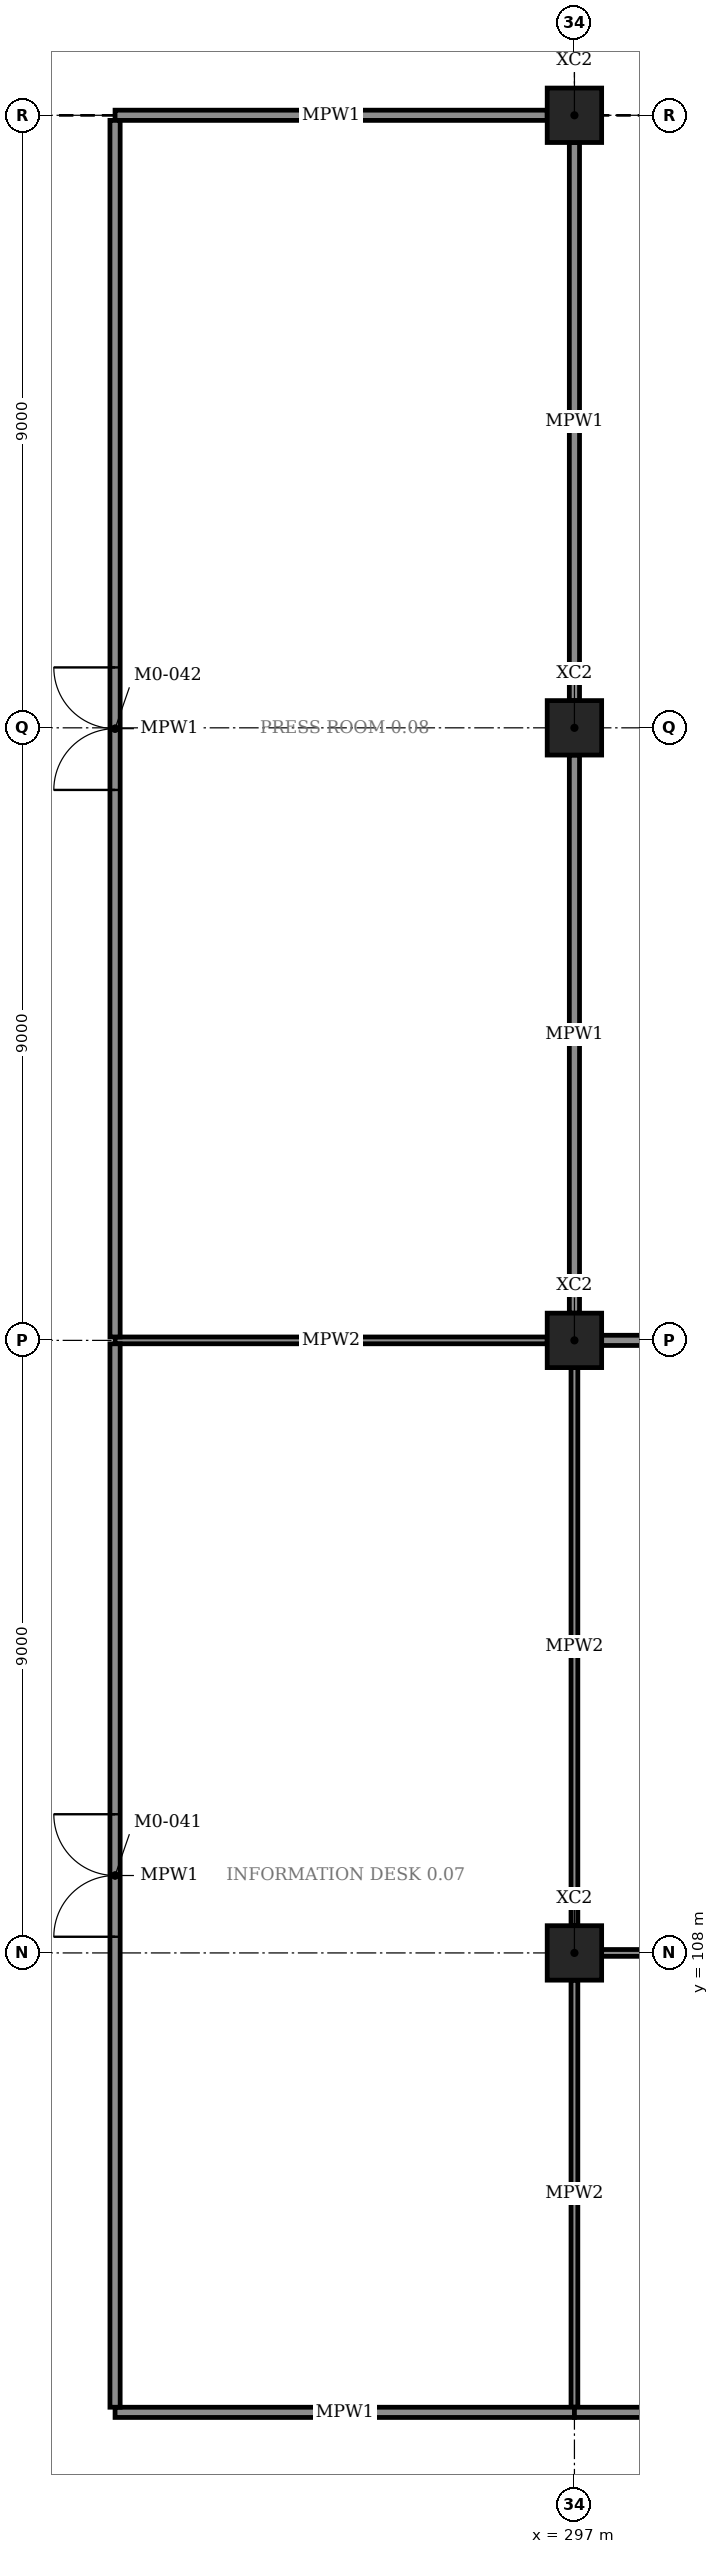
"""IFC4 building model, lengths in metres.
Left out: names, types, materials, properties, quantities, classifications, styles, units other than length and angle.
Written with IfcOpenShell. Run it as: python <this file> out.ifc"""

import sys

from ifc_helpers import new_model, si_unit, direction, frame, frame_2d, origin, origin_2d, place, context, subcontext, project, spatial, rectangle, extrude, element, fill, save


model = new_model("IFC4")
c1 = context("Model", 3, precision=1e-05, world=origin(), true_north=direction((0.0, 1.0)))
c2 = subcontext(c1, "Body", "Model", "MODEL_VIEW")
j1 = project(units=[si_unit("LENGTHUNIT", "METRE"), si_unit("PLANEANGLEUNIT", "RADIAN")], contexts=[c1])
p1 = place(None, origin())
s1 = spatial("IfcSite", under=j1, at=p1, CompositionType="ELEMENT")
p2 = place(p1, origin())
s2 = spatial("IfcBuilding", under=s1, at=p2, CompositionType="ELEMENT")
p3 = place(p2, origin())
s3 = spatial("IfcBuildingStorey", under=s2, at=p3, CompositionType="ELEMENT", Elevation=0.0)
for number, where, z_axis, x_axis in (
    (1, (297.0, 108.0, -0.3), (0.0, 0.0, 1.0), (1.0, 0.0, 0.0)),
    (2, (297.0, 117.0, -0.3), (0.0, 0.0, 1.0), (1.0, 0.0, 0.0)),
    (3, (297.0, 126.0, -0.3), (0.0, 0.0, 1.0), (1.0, 0.0, 0.0)),
    (4, (297.0, 135.0, -0.3), (0.0, 0.0, 1.0), (1.0, 0.0, 0.0)),
):
    element("IfcColumn", number, at=place(p3, frame(where, z_axis=z_axis, x_axis=x_axis)), inside=s3, PredefinedType="COLUMN", context=c2, shape_type="SweptSolid", body=[
        extrude(rectangle(XDim=0.8, YDim=0.8, at=origin_2d()), origin(), (0.0, 0.0, 1.0), 6.3),
    ])
p4 = place(p3, frame((290.25, 101.25, 0.0), z_axis=(0.0, 0.0, 1.0), x_axis=(1.0, 0.0, 0.0)))
e5 = element("IfcWall", 5, at=p4, inside=s3, PredefinedType="PARTITIONING", context=c2, shape_type="SweptSolid", body=[
    extrude(rectangle(XDim=6.75, YDim=0.15, at=frame_2d((3.375, 0.0))), origin(), (0.0, 0.0, 1.0), 4.82),
])
p5 = place(p3, frame((290.25, 117.0, 0.0), z_axis=(0.0, 0.0, 1.0), x_axis=(1.0, 0.0, 0.0)))
e6 = element("IfcWall", 6, at=p5, inside=s3, PredefinedType="PARTITIONING", context=c2, shape_type="SweptSolid", body=[
    extrude(rectangle(XDim=6.35, YDim=0.1, at=frame_2d((3.175, 0.0))), origin(), (0.0, 0.0, 1.0), 4.82),
])
p6 = place(p3, frame((290.25, 101.325, 0.0), z_axis=(0.0, 0.0, 1.0), x_axis=(0.0, 1.0, 0.0)))
e7 = element("IfcWall", 7, at=p6, inside=s3, PredefinedType="PARTITIONING", context=c2, shape_type="SweptSolid", body=[
    extrude(rectangle(XDim=15.625, YDim=0.15, at=frame_2d((7.812, 0.0))), origin(), (0.0, 0.0, 1.0), 4.82),
])
p7 = place(p6, frame((6.913, 0.0, 0.0)))
e8 = element("IfcOpeningElement", 8, at=p7, cuts=e7, PredefinedType="OPENING", context=c2, shape_type="SweptSolid", body=[
    extrude(rectangle(XDim=1.8, YDim=2.4, at=frame_2d((0.9, 1.2))), frame((0.0, 0.085, 0.0), z_axis=(0.0, -1.0, 0.0), x_axis=(1.0, 0.0, 0.0)), (0.0, 0.0, 1.0), 0.17),
])
p8 = place(p3, frame((297.0, 101.325, 0.0), z_axis=(0.0, 0.0, 1.0), x_axis=(0.0, 1.0, 0.0)))
e9 = element("IfcWall", 9, at=p8, inside=s3, PredefinedType="PARTITIONING", context=c2, shape_type="SweptSolid", body=[
    extrude(rectangle(XDim=6.275, YDim=0.1, at=frame_2d((3.138, 0.0))), origin(), (0.0, 0.0, 1.0), 4.82),
])
p9 = place(p3, frame((297.0, 108.4, 0.0), z_axis=(0.0, 0.0, 1.0), x_axis=(0.0, 1.0, 0.0)))
e10 = element("IfcWall", 10, at=p9, inside=s3, PredefinedType="PARTITIONING", context=c2, shape_type="SweptSolid", body=[
    extrude(rectangle(XDim=8.2, YDim=0.1, at=frame_2d((4.1, 0.0))), origin(), (0.0, 0.0, 1.0), 4.82),
])
p10 = place(p3, frame((290.25, 135.0, 0.0), z_axis=(0.0, 0.0, 1.0), x_axis=(1.0, 0.0, 0.0)))
e11 = element("IfcWall", 11, at=p10, inside=s3, PredefinedType="PARTITIONING", context=c2, shape_type="SweptSolid", body=[
    extrude(rectangle(XDim=6.35, YDim=0.15, at=frame_2d((3.175, 0.0))), origin(), (0.0, 0.0, 1.0), 4.82),
])
p11 = place(p3, frame((290.25, 117.05, 0.0), z_axis=(0.0, 0.0, 1.0), x_axis=(0.0, 1.0, 0.0)))
e12 = element("IfcWall", 12, at=p11, inside=s3, PredefinedType="PARTITIONING", context=c2, shape_type="SweptSolid", body=[
    extrude(rectangle(XDim=17.875, YDim=0.15, at=frame_2d((8.938, 0.0))), origin(), (0.0, 0.0, 1.0), 4.82),
])
p12 = place(p11, frame((8.038, 0.0, 0.0)))
e13 = element("IfcOpeningElement", 13, at=p12, cuts=e12, PredefinedType="OPENING", context=c2, shape_type="SweptSolid", body=[
    extrude(rectangle(XDim=1.8, YDim=2.4, at=frame_2d((0.9, 1.2))), frame((0.0, 0.085, 0.0), z_axis=(0.0, -1.0, 0.0), x_axis=(1.0, 0.0, 0.0)), (0.0, 0.0, 1.0), 0.17),
])
for number, where, z_axis, x_axis in (
    (14, (297.0, 117.4, 0.0), (0.0, 0.0, 1.0), (0.0, 1.0, 0.0)),
    (15, (297.0, 126.4, 0.0), (0.0, 0.0, 1.0), (0.0, 1.0, 0.0)),
):
    element("IfcWall", number, at=place(p3, frame(where, z_axis=z_axis, x_axis=x_axis)), inside=s3, PredefinedType="PARTITIONING", context=c2, shape_type="SweptSolid", body=[
        extrude(rectangle(XDim=8.2, YDim=0.15, at=frame_2d((4.1, 0.0))), origin(), (0.0, 0.0, 1.0), 4.82),
    ])
p13 = place(p3, frame((297.0, 101.25, 0.0), z_axis=(0.0, 0.0, 1.0), x_axis=(1.0, 0.0, 0.0)))
e16 = element("IfcWall", 16, at=p13, inside=s3, PredefinedType="PARTITIONING", context=c2, shape_type="SweptSolid", body=[
    extrude(rectangle(XDim=18.0, YDim=0.15, at=frame_2d((9.0, 0.0))), origin(), (0.0, 0.0, 1.0), 4.82),
])
p14 = place(p13, frame((8.1, 0.0, 0.0)))
e17 = element("IfcOpeningElement", 17, at=p14, cuts=e16, PredefinedType="OPENING", context=c2, shape_type="SweptSolid", body=[
    extrude(rectangle(XDim=1.8, YDim=2.4, at=frame_2d((0.9, 1.2))), frame((0.0, 0.085, 0.0), z_axis=(0.0, -1.0, 0.0), x_axis=(1.0, 0.0, 0.0)), (0.0, 0.0, 1.0), 0.17),
])
p15 = place(p3, frame((297.4, 108.0, 0.0), z_axis=(0.0, 0.0, 1.0), x_axis=(1.0, 0.0, 0.0)))
e18 = element("IfcWall", 18, at=p15, inside=s3, PredefinedType="PARTITIONING", context=c2, shape_type="SweptSolid", body=[
    extrude(rectangle(XDim=8.2, YDim=0.1, at=frame_2d((4.1, 0.0))), origin(), (0.0, 0.0, 1.0), 4.82),
])
p16 = place(p3, frame((297.4, 117.0, 0.0), z_axis=(0.0, 0.0, 1.0), x_axis=(1.0, 0.0, 0.0)))
e19 = element("IfcWall", 19, at=p16, inside=s3, PredefinedType="PARTITIONING", context=c2, shape_type="SweptSolid", body=[
    extrude(rectangle(XDim=8.2, YDim=0.15, at=frame_2d((4.1, 0.0))), origin(), (0.0, 0.0, 1.0), 4.82),
])
p17 = place(p16, frame((3.2, 0.0, 0.0)))
e20 = element("IfcOpeningElement", 20, at=p17, cuts=e19, PredefinedType="OPENING", context=c2, shape_type="SweptSolid", body=[
    extrude(rectangle(XDim=1.8, YDim=2.4, at=frame_2d((0.9, 1.2))), frame((0.0, 0.085, 0.0), z_axis=(0.0, -1.0, 0.0), x_axis=(1.0, 0.0, 0.0)), (0.0, 0.0, 1.0), 0.17),
])
p18 = place(p7, origin())
e21 = element("IfcDoor", 21, at=p18, inside=s3, OperationType="DOUBLE_DOOR_SINGLE_SWING", PredefinedType="DOOR", context=c2, shape_type="SweptSolid", body=[
    extrude(rectangle(XDim=1.8, YDim=2.4, at=frame_2d((0.9, 1.2))), frame((0.0, 0.025, 0.0), z_axis=(0.0, -1.0, 0.0), x_axis=(1.0, 0.0, 0.0)), (0.0, 0.0, 1.0), 0.05),
])
fill(e8, e21)
p19 = place(p12, origin())
e22 = element("IfcDoor", 22, at=p19, inside=s3, OperationType="DOUBLE_DOOR_SINGLE_SWING", PredefinedType="DOOR", context=c2, shape_type="SweptSolid", body=[
    extrude(rectangle(XDim=1.8, YDim=2.4, at=frame_2d((0.9, 1.2))), frame((0.0, 0.025, 0.0), z_axis=(0.0, -1.0, 0.0), x_axis=(1.0, 0.0, 0.0)), (0.0, 0.0, 1.0), 0.05),
])
fill(e13, e22)
save(model, sys.argv[1])
